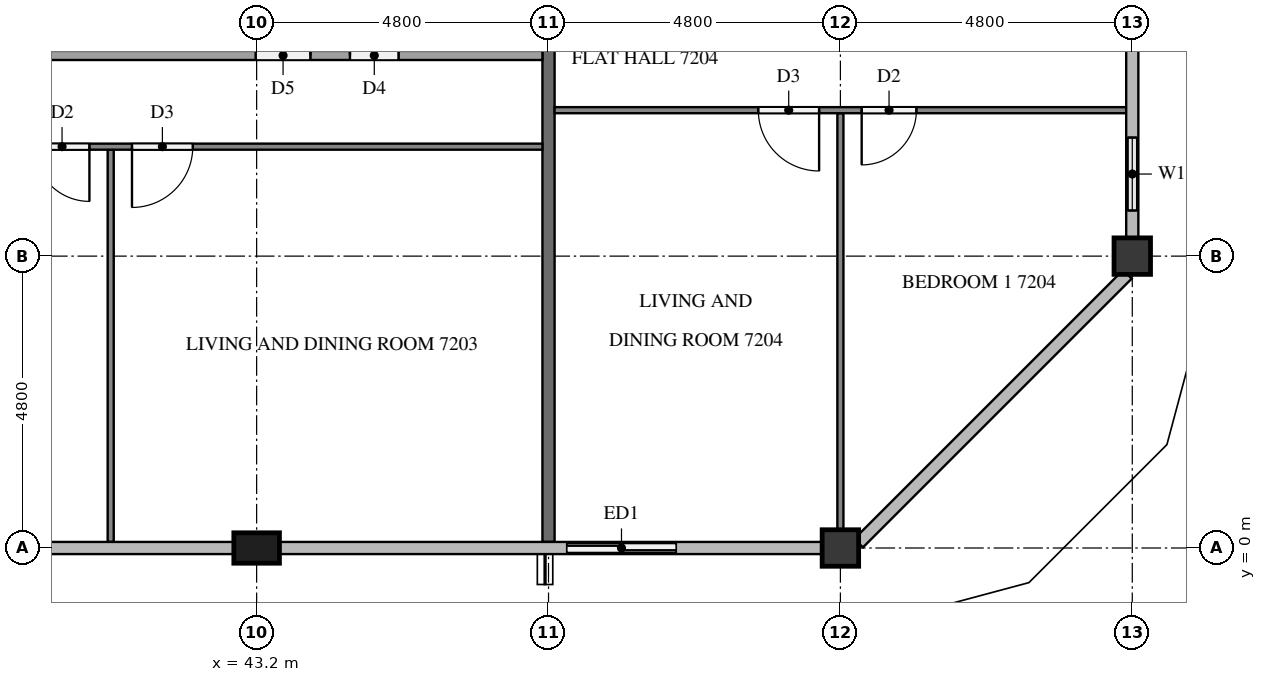
"""IFC4 building model, lengths in metres.
Left out: names, types, materials, properties, quantities, classifications, styles, units other than length and angle.
Written with IfcOpenShell. Run it as: python <this file> out.ifc"""

import sys

from ifc_helpers import new_model, si_unit, direction, frame, frame_2d, origin, origin_2d, place, context, subcontext, project, spatial, rectangle, extrude, element, fill, save


model = new_model("IFC4")
c1 = context("Model", 3, precision=1e-05, world=origin(), true_north=direction((0.0, 1.0)))
c2 = subcontext(c1, "Body", "Model", "MODEL_VIEW")
j1 = project(units=[si_unit("LENGTHUNIT", "METRE"), si_unit("PLANEANGLEUNIT", "RADIAN")], contexts=[c1])
p1 = place(None, origin())
s1 = spatial("IfcSite", under=j1, at=p1, CompositionType="ELEMENT")
p2 = place(p1, origin())
s2 = spatial("IfcBuilding", under=s1, at=p2, CompositionType="ELEMENT")
p3 = place(p2, frame((0.0, 0.0, 275.6)))
s3 = spatial("IfcBuildingStorey", under=s2, at=p3, CompositionType="ELEMENT", Elevation=275.6)
p4 = place(p3, frame((43.2, 0.0, 0.0), z_axis=(0.0, 0.0, 1.0), x_axis=(1.0, 0.0, 0.0)))
e1 = element("IfcColumn", 1, at=p4, inside=s3, PredefinedType="COLUMN", context=c2, shape_type="SweptSolid", body=[
    extrude(rectangle(XDim=0.75, YDim=0.5, at=origin_2d()), origin(), (0.0, 0.0, 1.0), 3.2),
])
for number, where, z_axis, x_axis in (
    (2, (52.8, 0.0, 0.0), (0.0, 0.0, 1.0), (1.0, 0.0, 0.0)),
    (3, (57.6, 4.8, 0.0), (0.0, 0.0, 1.0), (1.0, 0.0, 0.0)),
):
    element("IfcColumn", number, at=place(p3, frame(where, z_axis=z_axis, x_axis=x_axis)), inside=s3, PredefinedType="COLUMN", context=c2, shape_type="SweptSolid", body=[
        extrude(rectangle(XDim=0.6, YDim=0.6, at=origin_2d()), origin(), (0.0, 0.0, 1.0), 3.2),
    ])
p5 = place(p3, frame((48.0, 0.0, 0.0), z_axis=(0.0, 0.0, 1.0), x_axis=(1.0, 0.0, 0.0)))
e4 = element("IfcWall", 4, at=p5, inside=s3, PredefinedType="SOLIDWALL", context=c2, shape_type="SweptSolid", body=[
    extrude(rectangle(XDim=2.4, YDim=0.15, at=frame_2d((1.2, 0.0))), origin(), (0.0, 0.0, 1.0), 3.2),
])
p6 = place(p5, frame((0.3, 0.0, 0.0)))
e5 = element("IfcOpeningElement", 5, at=p6, cuts=e4, PredefinedType="OPENING", context=c2, shape_type="SweptSolid", body=[
    extrude(rectangle(XDim=1.8, YDim=2.4, at=frame_2d((0.9, 1.2))), frame((0.0, 0.085, 0.0), z_axis=(0.0, -1.0, 0.0), x_axis=(1.0, 0.0, 0.0)), (0.0, 0.0, 1.0), 0.17),
])
p7 = place(p3, frame((57.6, 5.1, 0.0), z_axis=(0.0, 0.0, 1.0), x_axis=(0.0, 1.0, 0.0)))
e6 = element("IfcWall", 6, at=p7, inside=s3, PredefinedType="SOLIDWALL", context=c2, shape_type="SweptSolid", body=[
    extrude(rectangle(XDim=2.1, YDim=0.15, at=frame_2d((1.05, 0.0))), origin(), (0.0, 0.0, 1.0), 3.2),
])
p8 = place(p7, frame((0.45, 0.0, 0.9)))
e7 = element("IfcOpeningElement", 7, at=p8, cuts=e6, PredefinedType="OPENING", context=c2, shape_type="SweptSolid", body=[
    extrude(rectangle(XDim=1.2, YDim=1.4, at=frame_2d((0.6, 0.7))), frame((0.0, 0.085, 0.0), z_axis=(0.0, -1.0, 0.0), x_axis=(1.0, 0.0, 0.0)), (0.0, 0.0, 1.0), 0.17),
])
p9 = place(p3, frame((48.0, 11.9, 0.0), z_axis=(0.0, 0.0, 1.0), x_axis=(0.0, -1.0, 0.0)))
e8 = element("IfcWall", 8, at=p9, inside=s3, PredefinedType="PARTITIONING", context=c2, shape_type="SweptSolid", body=[
    extrude(rectangle(XDim=11.8, YDim=0.2, at=frame_2d((5.9, 0.0))), origin(), (0.0, 0.0, 1.0), 3.2),
])
p10 = place(p3, frame((40.8, 6.55, 0.0), z_axis=(0.0, 0.0, 1.0), x_axis=(0.0, -1.0, 0.0)))
e9 = element("IfcWall", 9, at=p10, inside=s3, PredefinedType="PARTITIONING", context=c2, shape_type="SweptSolid", body=[
    extrude(rectangle(XDim=6.45, YDim=0.1, at=frame_2d((3.225, 0.0))), origin(), (0.0, 0.0, 1.0), 3.2),
])
p11 = place(p3, frame((47.9, 6.6, 0.0), z_axis=(0.0, 0.0, 1.0), x_axis=(-1.0, 0.0, 0.0)))
e10 = element("IfcWall", 10, at=p11, inside=s3, PredefinedType="PARTITIONING", context=c2, shape_type="SweptSolid", body=[
    extrude(rectangle(XDim=16.6, YDim=0.1, at=frame_2d((8.3, 0.0))), origin(), (0.0, 0.0, 1.0), 3.2),
])
p12 = place(p11, frame((15.4, 0.0, 0.0)))
e11 = element("IfcOpeningElement", 11, at=p12, cuts=e10, PredefinedType="OPENING", context=c2, shape_type="SweptSolid", body=[
    extrude(rectangle(XDim=0.9, YDim=2.1, at=frame_2d((0.45, 1.05))), frame((0.0, 0.06, 0.0), z_axis=(0.0, -1.0, 0.0), x_axis=(1.0, 0.0, 0.0)), (0.0, 0.0, 1.0), 0.12),
])
p13 = place(p11, frame((7.45, 0.0, 0.0)))
e12 = element("IfcOpeningElement", 12, at=p13, cuts=e10, PredefinedType="OPENING", context=c2, shape_type="SweptSolid", body=[
    extrude(rectangle(XDim=0.9, YDim=2.1, at=frame_2d((0.45, 1.05))), frame((0.0, 0.06, 0.0), z_axis=(0.0, -1.0, 0.0), x_axis=(1.0, 0.0, 0.0)), (0.0, 0.0, 1.0), 0.12),
])
p14 = place(p11, frame((5.75, 0.0, 0.0)))
e13 = element("IfcOpeningElement", 13, at=p14, cuts=e10, PredefinedType="OPENING", context=c2, shape_type="SweptSolid", body=[
    extrude(rectangle(XDim=1.0, YDim=2.1, at=frame_2d((0.5, 1.05))), frame((0.0, 0.06, 0.0), z_axis=(0.0, -1.0, 0.0), x_axis=(1.0, 0.0, 0.0)), (0.0, 0.0, 1.0), 0.12),
])
p15 = place(p3, frame((32.775, 8.1, 0.0), z_axis=(0.0, 0.0, 1.0), x_axis=(1.0, 0.0, 0.0)))
e14 = element("IfcWall", 14, at=p15, inside=s3, PredefinedType="PARTITIONING", context=c2, shape_type="SweptSolid", body=[
    extrude(rectangle(XDim=15.125, YDim=0.15, at=frame_2d((7.562, 0.0))), origin(), (0.0, 0.0, 1.0), 3.2),
])
p16 = place(p15, frame((0.3, 0.0, 0.0)))
e15 = element("IfcOpeningElement", 15, at=p16, cuts=e14, PredefinedType="OPENING", context=c2, shape_type="SweptSolid", body=[
    extrude(rectangle(XDim=0.9, YDim=2.1, at=frame_2d((0.45, 1.05))), frame((0.0, 0.085, 0.0), z_axis=(0.0, -1.0, 0.0), x_axis=(1.0, 0.0, 0.0)), (0.0, 0.0, 1.0), 0.17),
])
p17 = place(p15, frame((10.41, 0.0, 0.0)))
e16 = element("IfcOpeningElement", 16, at=p17, cuts=e14, PredefinedType="OPENING", context=c2, shape_type="SweptSolid", body=[
    extrude(rectangle(XDim=0.9, YDim=2.1, at=frame_2d((0.45, 1.05))), frame((0.0, 0.085, 0.0), z_axis=(0.0, -1.0, 0.0), x_axis=(1.0, 0.0, 0.0)), (0.0, 0.0, 1.0), 0.17),
])
p18 = place(p15, frame((11.96, 0.0, 0.0)))
e17 = element("IfcOpeningElement", 17, at=p18, cuts=e14, PredefinedType="OPENING", context=c2, shape_type="SweptSolid", body=[
    extrude(rectangle(XDim=0.8, YDim=2.1, at=frame_2d((0.4, 1.05))), frame((0.0, 0.085, 0.0), z_axis=(0.0, -1.0, 0.0), x_axis=(1.0, 0.0, 0.0)), (0.0, 0.0, 1.0), 0.17),
])
p19 = place(p3, frame((52.8, 7.15, 0.0), z_axis=(0.0, 0.0, 1.0), x_axis=(0.0, -1.0, 0.0)))
e18 = element("IfcWall", 18, at=p19, inside=s3, PredefinedType="PARTITIONING", context=c2, shape_type="SweptSolid", body=[
    extrude(rectangle(XDim=6.85, YDim=0.1, at=frame_2d((3.425, 0.0))), origin(), (0.0, 0.0, 1.0), 3.2),
])
p20 = place(p3, frame((57.5, 7.2, 0.0), z_axis=(0.0, 0.0, 1.0), x_axis=(-1.0, 0.0, 0.0)))
e19 = element("IfcWall", 19, at=p20, inside=s3, PredefinedType="PARTITIONING", context=c2, shape_type="SweptSolid", body=[
    extrude(rectangle(XDim=9.4, YDim=0.1, at=frame_2d((4.7, 0.0))), origin(), (0.0, 0.0, 1.0), 3.2),
])
p21 = place(p20, frame((5.05, 0.0, 0.0)))
e20 = element("IfcOpeningElement", 20, at=p21, cuts=e19, PredefinedType="OPENING", context=c2, shape_type="SweptSolid", body=[
    extrude(rectangle(XDim=1.0, YDim=2.1, at=frame_2d((0.5, 1.05))), frame((0.0, 0.06, 0.0), z_axis=(0.0, -1.0, 0.0), x_axis=(1.0, 0.0, 0.0)), (0.0, 0.0, 1.0), 0.12),
])
p22 = place(p20, frame((3.45, 0.0, 0.0)))
e21 = element("IfcOpeningElement", 21, at=p22, cuts=e19, PredefinedType="OPENING", context=c2, shape_type="SweptSolid", body=[
    extrude(rectangle(XDim=0.9, YDim=2.1, at=frame_2d((0.45, 1.05))), frame((0.0, 0.06, 0.0), z_axis=(0.0, -1.0, 0.0), x_axis=(1.0, 0.0, 0.0)), (0.0, 0.0, 1.0), 0.12),
])
p23 = place(p6, origin())
e22 = element("IfcDoor", 22, at=p23, inside=s3, OperationType="SLIDING_TO_RIGHT", PredefinedType="DOOR", context=c2, shape_type="SweptSolid", body=[
    extrude(rectangle(XDim=1.8, YDim=2.4, at=frame_2d((0.9, 1.2))), frame((0.0, 0.025, 0.0), z_axis=(0.0, -1.0, 0.0), x_axis=(1.0, 0.0, 0.0)), (0.0, 0.0, 1.0), 0.05),
])
fill(e5, e22)
p24 = place(p8, origin())
e23 = element("IfcWindow", 23, at=p24, inside=s3, PartitioningType="SINGLE_PANEL", PredefinedType="WINDOW", context=c2, shape_type="SweptSolid", body=[
    extrude(rectangle(XDim=1.2, YDim=1.4, at=frame_2d((0.6, 0.7))), frame((0.0, 0.03, 0.0), z_axis=(0.0, -1.0, 0.0), x_axis=(1.0, 0.0, 0.0)), (0.0, 0.0, 1.0), 0.06),
])
fill(e7, e23)
p25 = place(p13, origin())
e24 = element("IfcDoor", 24, at=p25, inside=s3, OperationType="SINGLE_SWING_LEFT", PredefinedType="DOOR", context=c2, shape_type="SweptSolid", body=[
    extrude(rectangle(XDim=0.9, YDim=2.1, at=frame_2d((0.45, 1.05))), frame((0.0, 0.025, 0.0), z_axis=(0.0, -1.0, 0.0), x_axis=(1.0, 0.0, 0.0)), (0.0, 0.0, 1.0), 0.05),
])
fill(e12, e24)
p26 = place(p14, origin())
e25 = element("IfcDoor", 25, at=p26, inside=s3, OperationType="SINGLE_SWING_RIGHT", PredefinedType="DOOR", context=c2, shape_type="SweptSolid", body=[
    extrude(rectangle(XDim=1.0, YDim=2.1, at=frame_2d((0.5, 1.05))), frame((0.0, 0.025, 0.0), z_axis=(0.0, -1.0, 0.0), x_axis=(1.0, 0.0, 0.0)), (0.0, 0.0, 1.0), 0.05),
])
fill(e13, e25)
p27 = place(p17, origin())
e26 = element("IfcDoor", 26, at=p27, inside=s3, OperationType="SINGLE_SWING_RIGHT", PredefinedType="DOOR", context=c2, shape_type="SweptSolid", body=[
    extrude(rectangle(XDim=0.9, YDim=2.1, at=frame_2d((0.45, 1.05))), frame((0.0, 0.025, 0.0), z_axis=(0.0, -1.0, 0.0), x_axis=(1.0, 0.0, 0.0)), (0.0, 0.0, 1.0), 0.05),
])
fill(e16, e26)
p28 = place(p18, origin())
e27 = element("IfcDoor", 27, at=p28, inside=s3, OperationType="SINGLE_SWING_LEFT", PredefinedType="DOOR", context=c2, shape_type="SweptSolid", body=[
    extrude(rectangle(XDim=0.8, YDim=2.1, at=frame_2d((0.4, 1.05))), frame((0.0, 0.025, 0.0), z_axis=(0.0, -1.0, 0.0), x_axis=(1.0, 0.0, 0.0)), (0.0, 0.0, 1.0), 0.05),
])
fill(e17, e27)
p29 = place(p21, origin())
e28 = element("IfcDoor", 28, at=p29, inside=s3, OperationType="SINGLE_SWING_LEFT", PredefinedType="DOOR", context=c2, shape_type="SweptSolid", body=[
    extrude(rectangle(XDim=1.0, YDim=2.1, at=frame_2d((0.5, 1.05))), frame((0.0, 0.025, 0.0), z_axis=(0.0, -1.0, 0.0), x_axis=(1.0, 0.0, 0.0)), (0.0, 0.0, 1.0), 0.05),
])
fill(e20, e28)
p30 = place(p22, origin())
e29 = element("IfcDoor", 29, at=p30, inside=s3, OperationType="SINGLE_SWING_RIGHT", PredefinedType="DOOR", context=c2, shape_type="SweptSolid", body=[
    extrude(rectangle(XDim=0.9, YDim=2.1, at=frame_2d((0.45, 1.05))), frame((0.0, 0.025, 0.0), z_axis=(0.0, -1.0, 0.0), x_axis=(1.0, 0.0, 0.0)), (0.0, 0.0, 1.0), 0.05),
])
fill(e21, e29)
save(model, sys.argv[1])
